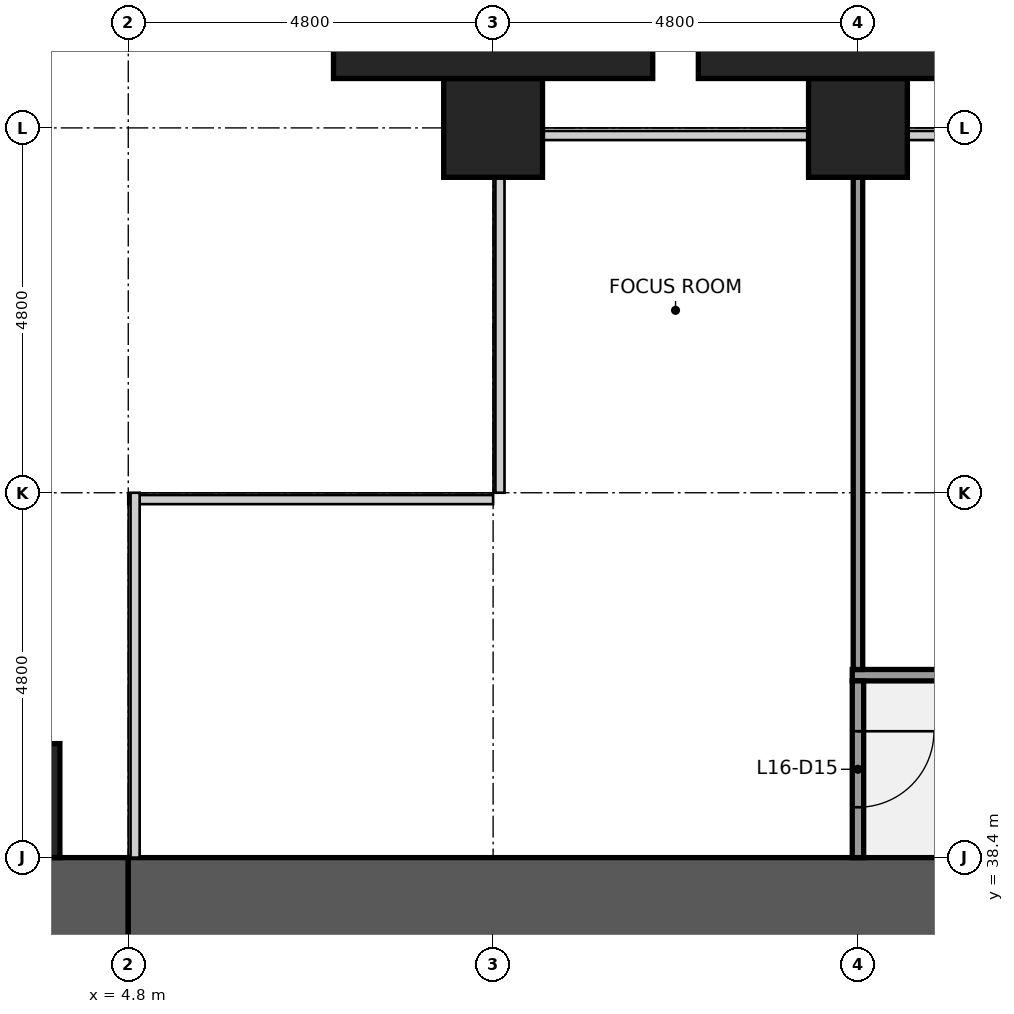
"""IFC4 building model, lengths in metres.
Left out: names, types, materials, properties, quantities, classifications, styles, units other than length and angle.
Written with IfcOpenShell. Run it as: python <this file> out.ifc"""

import sys

from ifc_helpers import new_model, si_unit, direction, frame, frame_2d, origin, origin_2d, place, context, subcontext, project, spatial, rectangle, extrude, element, fill, save


model = new_model("IFC4")
c1 = context("Model", 3, precision=1e-05, world=origin(), true_north=direction((0.0, 1.0)))
c2 = subcontext(c1, "Body", "Model", "MODEL_VIEW")
j1 = project(units=[si_unit("LENGTHUNIT", "METRE"), si_unit("PLANEANGLEUNIT", "RADIAN")], contexts=[c1])
p1 = place(None, origin())
s1 = spatial("IfcSite", under=j1, at=p1, CompositionType="ELEMENT")
p2 = place(p1, origin())
s2 = spatial("IfcBuilding", under=s1, at=p2, CompositionType="ELEMENT")
p3 = place(p2, frame((0.0, 0.0, 75.0)))
s3 = spatial("IfcBuildingStorey", under=s2, at=p3, CompositionType="ELEMENT", Elevation=75.0)
for number, where, z_axis, x_axis in (
    (1, (9.6, 48.0, 0.0), (0.0, 0.0, 1.0), (1.0, 0.0, 0.0)),
    (2, (14.4, 48.0, 0.0), (0.0, 0.0, 1.0), (1.0, 0.0, 0.0)),
):
    element("IfcColumn", number, at=place(p3, frame(where, z_axis=z_axis, x_axis=x_axis)), inside=s3, PredefinedType="COLUMN", context=c2, shape_type="SweptSolid", body=[
        extrude(rectangle(XDim=1.3, YDim=1.3, at=origin_2d()), origin(), (0.0, 0.0, 1.0), 4.0),
    ])
p4 = place(p3, frame((1.2, 37.8, 0.0), z_axis=(0.0, 0.0, 1.0), x_axis=(1.0, 0.0, 0.0)))
e3 = element("IfcWall", 3, at=p4, inside=s3, PredefinedType="SHEAR", context=c2, shape_type="SweptSolid", body=[
    extrude(rectangle(XDim=3.6, YDim=1.2, at=frame_2d((1.8, 0.0))), origin(), (0.0, 0.0, 1.0), 3.84),
])
p5 = place(p3, frame((4.8, 37.8, 0.0), z_axis=(0.0, 0.0, 1.0), x_axis=(1.0, 0.0, 0.0)))
e4 = element("IfcWall", 4, at=p5, inside=s3, PredefinedType="SHEAR", context=c2, shape_type="SweptSolid", body=[
    extrude(rectangle(XDim=13.2, YDim=1.2, at=frame_2d((6.6, 0.0))), origin(), (0.0, 0.0, 1.0), 3.84),
])
p6 = place(p5, frame((11.45, 0.0, 0.0)))
e5 = element("IfcOpeningElement", 5, at=p6, cuts=e4, PredefinedType="OPENING", context=c2, shape_type="SweptSolid", body=[
    extrude(rectangle(XDim=1.1, YDim=2.1, at=frame_2d((0.55, 1.05))), frame((0.0, 0.61, 0.0), z_axis=(0.0, -1.0, 0.0), x_axis=(1.0, 0.0, 0.0)), (0.0, 0.0, 1.0), 1.22),
])
p7 = place(p3, frame((14.325, 40.8, 0.0), z_axis=(0.0, 0.0, 1.0), x_axis=(1.0, 0.0, 0.0)))
e6 = element("IfcWall", 6, at=p7, inside=s3, PredefinedType="PARTITIONING", context=c2, shape_type="SweptSolid", body=[
    extrude(rectangle(XDim=4.95, YDim=0.15, at=frame_2d((2.475, 0.0))), origin(), (0.0, 0.0, 1.0), 2.87),
])
p8 = place(p7, frame((1.975, 0.0, 0.0)))
e7 = element("IfcOpeningElement", 7, at=p8, cuts=e6, PredefinedType="OPENING", context=c2, shape_type="SweptSolid", body=[
    extrude(rectangle(XDim=1.0, YDim=2.1, at=frame_2d((0.5, 1.05))), frame((0.0, 0.085, 0.0), z_axis=(0.0, -1.0, 0.0), x_axis=(1.0, 0.0, 0.0)), (0.0, 0.0, 1.0), 0.17),
])
p9 = place(p3, frame((14.4, 40.875, 0.0), z_axis=(0.0, 0.0, 1.0), x_axis=(0.0, 1.0, 0.0)))
e8 = element("IfcWall", 8, at=p9, inside=s3, PredefinedType="PARTITIONING", context=c2, shape_type="SweptSolid", body=[
    extrude(rectangle(XDim=6.475, YDim=0.125, at=frame_2d((3.238, 0.0))), origin(), (0.0, 0.0, 1.0), 2.87),
])
p10 = place(p3, frame((14.4, 38.4, 0.0), z_axis=(0.0, 0.0, 1.0), x_axis=(0.0, 1.0, 0.0)))
e9 = element("IfcWall", 9, at=p10, inside=s3, PredefinedType="PARTITIONING", context=c2, shape_type="SweptSolid", body=[
    extrude(rectangle(XDim=2.325, YDim=0.15, at=frame_2d((1.163, 0.0))), origin(), (0.0, 0.0, 1.0), 2.87),
])
p11 = place(p10, frame((0.663, 0.0, 0.0)))
e10 = element("IfcOpeningElement", 10, at=p11, cuts=e9, PredefinedType="OPENING", context=c2, shape_type="SweptSolid", body=[
    extrude(rectangle(XDim=1.0, YDim=2.1, at=frame_2d((0.5, 1.05))), frame((0.0, 0.085, 0.0), z_axis=(0.0, -1.0, 0.0), x_axis=(1.0, 0.0, 0.0)), (0.0, 0.0, 1.0), 0.17),
])
p12 = place(p3, frame((2.4, 39.15, 0.0), z_axis=(0.0, 0.0, 1.0), x_axis=(1.0, 0.0, 0.0)))
e11 = element("IfcColumn", 11, at=p12, inside=s3, PredefinedType="PILASTER", context=c2, shape_type="SweptSolid", body=[
    extrude(rectangle(XDim=3.0, YDim=1.5, at=origin_2d()), origin(), (0.0, 0.0, 1.0), 4.0),
])
for number, where, z_axis, x_axis in (
    (12, (9.6, 49.075, 0.0), (0.0, 0.0, 1.0), (1.0, 0.0, 0.0)),
    (13, (14.4, 49.075, 0.0), (0.0, 0.0, 1.0), (1.0, 0.0, 0.0)),
):
    element("IfcColumn", number, at=place(p3, frame(where, z_axis=z_axis, x_axis=x_axis)), inside=s3, PredefinedType="PILASTER", context=c2, shape_type="SweptSolid", body=[
        extrude(rectangle(XDim=4.2, YDim=0.85, at=origin_2d()), origin(), (0.0, 0.0, 1.0), 4.0),
    ])
p13 = place(p11, origin())
e14 = element("IfcDoor", 14, at=p13, inside=s3, OperationType="SINGLE_SWING_RIGHT", PredefinedType="DOOR", context=c2, shape_type="SweptSolid", body=[
    extrude(rectangle(XDim=1.0, YDim=2.1, at=frame_2d((0.5, 1.05))), frame((0.0, 0.025, 0.0), z_axis=(0.0, -1.0, 0.0), x_axis=(1.0, 0.0, 0.0)), (0.0, 0.0, 1.0), 0.05),
])
fill(e10, e14)
save(model, sys.argv[1])
